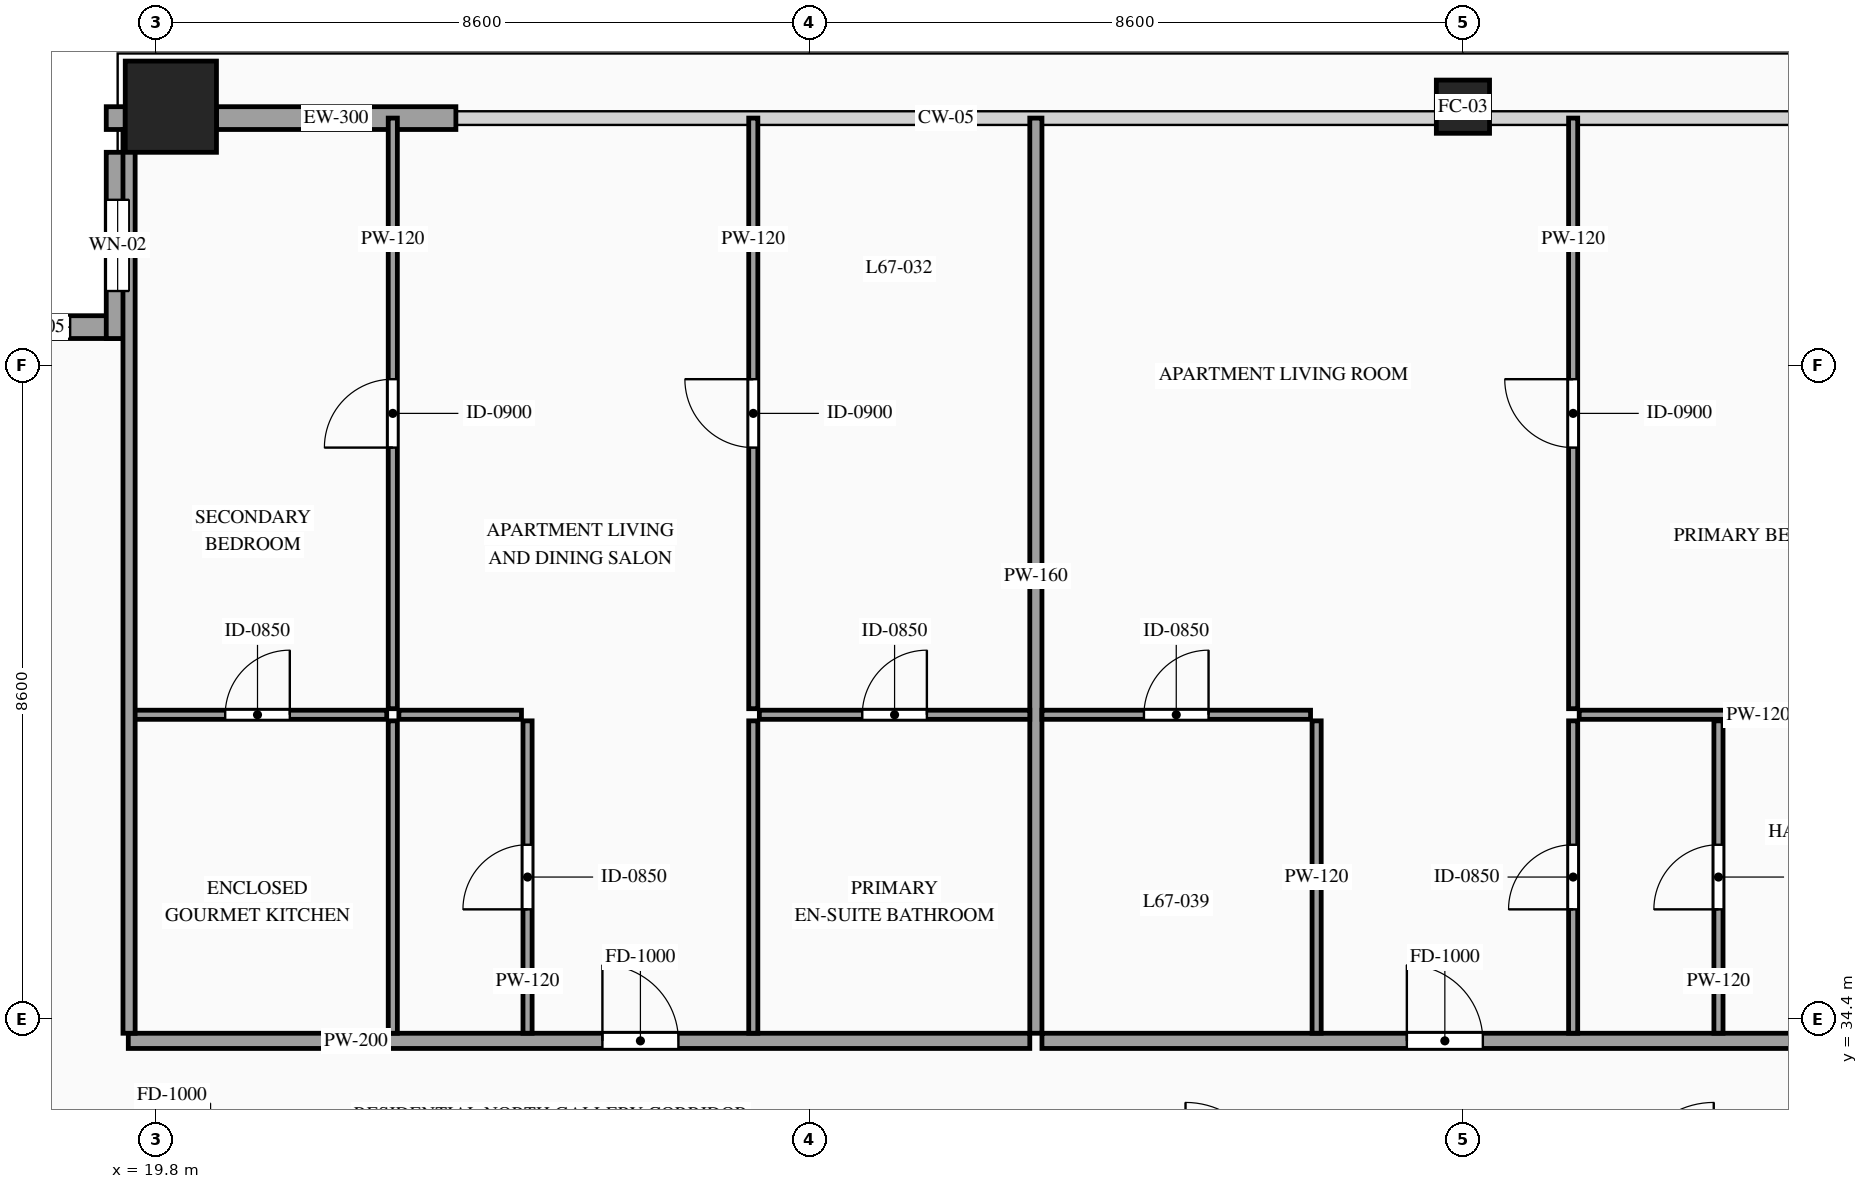
"""IFC4 building model, lengths in metres.
Left out: names, types, materials, properties, quantities, classifications, styles, units other than length and angle.
Written with IfcOpenShell. Run it as: python <this file> out.ifc"""

import sys

from ifc_helpers import new_model, si_unit, direction, frame, frame_2d, origin, origin_2d, place, context, subcontext, project, spatial, rectangle, hollow_rectangle, extrude, source, transform, mapped, element, fill, save


model = new_model("IFC4")
c1 = context("Model", 3, precision=1e-05, world=origin(), true_north=direction((0.0, 1.0)))
c2 = subcontext(c1, "Body", "Model", "MODEL_VIEW")
j1 = project(units=[si_unit("LENGTHUNIT", "METRE"), si_unit("PLANEANGLEUNIT", "RADIAN")], contexts=[c1])
p1 = place(None, origin())
s1 = spatial("IfcSite", under=j1, at=p1, CompositionType="ELEMENT")
p2 = place(p1, origin())
s2 = spatial("IfcBuilding", under=s1, at=p2, CompositionType="ELEMENT")
p3 = place(p2, frame((0.0, 0.0, 252.1)))
s3 = spatial("IfcBuildingStorey", under=s2, at=p3, CompositionType="ELEMENT", Elevation=252.1)
m1 = source(origin(), c2, "Body", "SweptSolid", [
    extrude(hollow_rectangle(XDim=1.2, YDim=1.2, WallThickness=0.055, at=origin_2d()), origin(), (0.0, 0.0, 1.0), 3.5),
])
p4 = place(p3, frame((20.0, 46.4, 0.0), z_axis=(0.0, 0.0, 1.0), x_axis=(1.0, 0.0, 0.0)))
e1 = element("IfcColumn", 1, at=p4, inside=s3, PredefinedType="COLUMN", context=c2, shape_type="MappedRepresentation", body=[
    mapped(m1, transform((0.0, 0.0, 0.0), scale=1.0)),
])
m2 = source(origin(), c2, "Body", "SweptSolid", [
    extrude(hollow_rectangle(XDim=0.7, YDim=0.7, WallThickness=0.032, at=origin_2d()), origin(), (0.0, 0.0, 1.0), 3.5),
])
p5 = place(p3, frame((37.0, 46.4, 0.0), z_axis=(0.0, 0.0, 1.0), x_axis=(1.0, 0.0, 0.0)))
e2 = element("IfcColumn", 2, at=p5, inside=s3, PredefinedType="COLUMN", context=c2, shape_type="MappedRepresentation", body=[
    mapped(m2, transform((0.0, 0.0, 0.0), scale=1.0)),
])
p6 = place(p3, frame((19.45, 43.5, 0.0), z_axis=(0.0, 0.0, 1.0), x_axis=(-1.0, 0.0, 0.0)))
e3 = element("IfcWall", 3, at=p6, inside=s3, PredefinedType="SOLIDWALL", context=c2, shape_type="SweptSolid", body=[
    extrude(rectangle(XDim=2.45, YDim=0.3, at=frame_2d((1.225, 0.0))), origin(), (0.0, 0.0, 1.0), 3.28),
])
p7 = place(p6, frame((0.775, 0.0, 0.85)))
e4 = element("IfcOpeningElement", 4, at=p7, cuts=e3, PredefinedType="OPENING", context=c2, shape_type="SweptSolid", body=[
    extrude(rectangle(XDim=0.9, YDim=1.5, at=frame_2d((0.45, 0.75))), frame((0.0, 0.165, 0.0), z_axis=(0.0, -1.0, 0.0), x_axis=(1.0, 0.0, 0.0)), (0.0, 0.0, 1.0), 0.33),
])
p8 = place(p3, frame((19.3, 45.8, 0.0), z_axis=(0.0, 0.0, 1.0), x_axis=(0.0, -1.0, 0.0)))
e5 = element("IfcWall", 5, at=p8, inside=s3, PredefinedType="SOLIDWALL", context=c2, shape_type="SweptSolid", body=[
    extrude(rectangle(XDim=2.45, YDim=0.3, at=frame_2d((1.225, 0.0))), origin(), (0.0, 0.0, 1.0), 3.28),
])
p9 = place(p8, frame((0.625, 0.0, 0.85)))
e6 = element("IfcOpeningElement", 6, at=p9, cuts=e5, PredefinedType="OPENING", context=c2, shape_type="SweptSolid", body=[
    extrude(rectangle(XDim=1.2, YDim=2.1, at=frame_2d((0.6, 1.05))), frame((0.0, 0.165, 0.0), z_axis=(0.0, -1.0, 0.0), x_axis=(1.0, 0.0, 0.0)), (0.0, 0.0, 1.0), 0.33),
])
m3 = source(origin(), c2, "Body", "SweptSolid", [
    extrude(rectangle(XDim=0.25, YDim=0.3, at=frame_2d((0.125, 0.0))), origin(), (0.0, 0.0, 1.0), 3.28),
])
p10 = place(p3, frame((19.15, 46.25, 0.0), z_axis=(0.0, 0.0, 1.0), x_axis=(1.0, 0.0, 0.0)))
e7 = element("IfcWall", 7, at=p10, inside=s3, PredefinedType="SOLIDWALL", context=c2, shape_type="MappedRepresentation", body=[
    mapped(m3, transform((0.0, 0.0, 0.0), scale=1.0)),
])
m4 = source(origin(), c2, "Body", "SweptSolid", [
    extrude(rectangle(XDim=3.15, YDim=0.3, at=frame_2d((1.575, 0.0))), origin(), (0.0, 0.0, 1.0), 2.835),
])
p11 = place(p3, frame((20.6, 46.25, 0.0), z_axis=(0.0, 0.0, 1.0), x_axis=(1.0, 0.0, 0.0)))
e8 = element("IfcWall", 8, at=p11, inside=s3, PredefinedType="SOLIDWALL", context=c2, shape_type="MappedRepresentation", body=[
    mapped(m4, transform((0.0, 0.0, 0.0), scale=1.0)),
])
p12 = place(p3, frame((19.44, 34.11, 0.0), z_axis=(0.0, 0.0, 1.0), x_axis=(1.0, 0.0, 0.0)))
e9 = element("IfcWall", 9, at=p12, inside=s3, PredefinedType="PARTITIONING", context=c2, shape_type="SweptSolid", body=[
    extrude(rectangle(XDim=11.861, YDim=0.2, at=frame_2d((5.931, 0.0))), origin(), (0.0, 0.0, 1.0), 3.28),
])
p13 = place(p12, frame((6.238, 0.0, 0.0)))
e10 = element("IfcOpeningElement", 10, at=p13, cuts=e9, PredefinedType="OPENING", context=c2, shape_type="SweptSolid", body=[
    extrude(rectangle(XDim=1.0, YDim=2.2, at=frame_2d((0.5, 1.1))), frame((0.0, 0.115, 0.0), z_axis=(0.0, -1.0, 0.0), x_axis=(1.0, 0.0, 0.0)), (0.0, 0.0, 1.0), 0.23),
])
m5 = source(origin(), c2, "Body", "SweptSolid", [
    extrude(rectangle(XDim=12.04, YDim=0.16, at=frame_2d((6.02, 0.0))), origin(), (0.0, 0.0, 1.0), 3.28),
])
p14 = place(p3, frame((31.381, 34.21, 0.0), z_axis=(0.0, 0.0, 1.0), x_axis=(0.0, 1.0, 0.0)))
e11 = element("IfcWall", 11, at=p14, inside=s3, PredefinedType="PARTITIONING", context=c2, shape_type="MappedRepresentation", body=[
    mapped(m5, transform((0.0, 0.0, 0.0), scale=1.0)),
])
p15 = place(p3, frame((19.44, 38.4, 0.0), z_axis=(0.0, 0.0, 1.0), x_axis=(1.0, 0.0, 0.0)))
e12 = element("IfcWall", 12, at=p15, inside=s3, PredefinedType="PARTITIONING", context=c2, shape_type="SweptSolid", body=[
    extrude(rectangle(XDim=3.4, YDim=0.12, at=frame_2d((1.7, 0.0))), origin(), (0.0, 0.0, 1.0), 3.28),
])
p16 = place(p15, frame((1.275, 0.0, 0.0)))
e13 = element("IfcOpeningElement", 13, at=p16, cuts=e12, PredefinedType="OPENING", context=c2, shape_type="SweptSolid", body=[
    extrude(rectangle(XDim=0.85, YDim=2.1, at=frame_2d((0.425, 1.05))), frame((0.0, 0.075, 0.0), z_axis=(0.0, -1.0, 0.0), x_axis=(1.0, 0.0, 0.0)), (0.0, 0.0, 1.0), 0.15),
])
m6 = source(origin(), c2, "Body", "SweptSolid", [
    extrude(rectangle(XDim=4.11, YDim=0.12, at=frame_2d((2.055, 0.0))), origin(), (0.0, 0.0, 1.0), 3.28),
])
p17 = place(p3, frame((22.92, 34.21, 0.0), z_axis=(0.0, 0.0, 1.0), x_axis=(0.0, 1.0, 0.0)))
e14 = element("IfcWall", 14, at=p17, inside=s3, PredefinedType="PARTITIONING", context=c2, shape_type="MappedRepresentation", body=[
    mapped(m6, transform((0.0, 0.0, 0.0), scale=1.0)),
])
m7 = source(origin(), c2, "Body", "SweptSolid", [
    extrude(rectangle(XDim=1.613, YDim=0.12, at=frame_2d((0.807, 0.0))), origin(), (0.0, 0.0, 1.0), 3.28),
])
p18 = place(p3, frame((23.0, 38.4, 0.0), z_axis=(0.0, 0.0, 1.0), x_axis=(1.0, 0.0, 0.0)))
e15 = element("IfcWall", 15, at=p18, inside=s3, PredefinedType="PARTITIONING", context=c2, shape_type="MappedRepresentation", body=[
    mapped(m7, transform((0.0, 0.0, 0.0), scale=1.0)),
])
p19 = place(p3, frame((24.693, 34.21, 0.0), z_axis=(0.0, 0.0, 1.0), x_axis=(0.0, 1.0, 0.0)))
e16 = element("IfcWall", 16, at=p19, inside=s3, PredefinedType="PARTITIONING", context=c2, shape_type="SweptSolid", body=[
    extrude(rectangle(XDim=4.11, YDim=0.12, at=frame_2d((2.055, 0.0))), origin(), (0.0, 0.0, 1.0), 3.28),
])
p20 = place(p19, frame((1.63, 0.0, 0.0)))
e17 = element("IfcOpeningElement", 17, at=p20, cuts=e16, PredefinedType="OPENING", context=c2, shape_type="SweptSolid", body=[
    extrude(rectangle(XDim=0.85, YDim=2.1, at=frame_2d((0.425, 1.05))), frame((0.0, 0.075, 0.0), z_axis=(0.0, -1.0, 0.0), x_axis=(1.0, 0.0, 0.0)), (0.0, 0.0, 1.0), 0.15),
])
p21 = place(p3, frame((27.743, 38.4, 0.0), z_axis=(0.0, 0.0, 1.0), x_axis=(1.0, 0.0, 0.0)))
e18 = element("IfcWall", 18, at=p21, inside=s3, PredefinedType="PARTITIONING", context=c2, shape_type="SweptSolid", body=[
    extrude(rectangle(XDim=3.558, YDim=0.12, at=frame_2d((1.779, 0.0))), origin(), (0.0, 0.0, 1.0), 3.28),
])
p22 = place(p21, frame((1.354, 0.0, 0.0)))
e19 = element("IfcOpeningElement", 19, at=p22, cuts=e18, PredefinedType="OPENING", context=c2, shape_type="SweptSolid", body=[
    extrude(rectangle(XDim=0.85, YDim=2.1, at=frame_2d((0.425, 1.05))), frame((0.0, 0.075, 0.0), z_axis=(0.0, -1.0, 0.0), x_axis=(1.0, 0.0, 0.0)), (0.0, 0.0, 1.0), 0.15),
])
p23 = place(p3, frame((27.663, 34.21, 0.0), z_axis=(0.0, 0.0, 1.0), x_axis=(0.0, 1.0, 0.0)))
e20 = element("IfcWall", 20, at=p23, inside=s3, PredefinedType="PARTITIONING", context=c2, shape_type="MappedRepresentation", body=[
    mapped(m6, transform((0.0, 0.0, 0.0), scale=1.0)),
])
p24 = place(p3, frame((22.92, 38.48, 0.0), z_axis=(0.0, 0.0, 1.0), x_axis=(0.0, 1.0, 0.0)))
e21 = element("IfcWall", 21, at=p24, inside=s3, PredefinedType="PARTITIONING", context=c2, shape_type="SweptSolid", body=[
    extrude(rectangle(XDim=7.77, YDim=0.12, at=frame_2d((3.885, 0.0))), origin(), (0.0, 0.0, 1.0), 3.28),
])
p25 = place(p24, frame((3.435, 0.0, 0.0)))
e22 = element("IfcOpeningElement", 22, at=p25, cuts=e21, PredefinedType="OPENING", context=c2, shape_type="SweptSolid", body=[
    extrude(rectangle(XDim=0.9, YDim=2.15, at=frame_2d((0.45, 1.075))), frame((0.0, 0.075, 0.0), z_axis=(0.0, -1.0, 0.0), x_axis=(1.0, 0.0, 0.0)), (0.0, 0.0, 1.0), 0.15),
])
p26 = place(p3, frame((27.663, 38.48, 0.0), z_axis=(0.0, 0.0, 1.0), x_axis=(0.0, 1.0, 0.0)))
e23 = element("IfcWall", 23, at=p26, inside=s3, PredefinedType="PARTITIONING", context=c2, shape_type="SweptSolid", body=[
    extrude(rectangle(XDim=7.77, YDim=0.12, at=frame_2d((3.885, 0.0))), origin(), (0.0, 0.0, 1.0), 3.28),
])
p27 = place(p26, frame((3.435, 0.0, 0.0)))
e24 = element("IfcOpeningElement", 24, at=p27, cuts=e23, PredefinedType="OPENING", context=c2, shape_type="SweptSolid", body=[
    extrude(rectangle(XDim=0.9, YDim=2.15, at=frame_2d((0.45, 1.075))), frame((0.0, 0.075, 0.0), z_axis=(0.0, -1.0, 0.0), x_axis=(1.0, 0.0, 0.0)), (0.0, 0.0, 1.0), 0.15),
])
p28 = place(p3, frame((31.461, 34.11, 0.0), z_axis=(0.0, 0.0, 1.0), x_axis=(1.0, 0.0, 0.0)))
e25 = element("IfcWall", 25, at=p28, inside=s3, PredefinedType="PARTITIONING", context=c2, shape_type="SweptSolid", body=[
    extrude(rectangle(XDim=11.781, YDim=0.2, at=frame_2d((5.891, 0.0))), origin(), (0.0, 0.0, 1.0), 3.28),
])
p29 = place(p28, frame((4.801, 0.0, 0.0)))
e26 = element("IfcOpeningElement", 26, at=p29, cuts=e25, PredefinedType="OPENING", context=c2, shape_type="SweptSolid", body=[
    extrude(rectangle(XDim=1.0, YDim=2.2, at=frame_2d((0.5, 1.1))), frame((0.0, 0.115, 0.0), z_axis=(0.0, -1.0, 0.0), x_axis=(1.0, 0.0, 0.0)), (0.0, 0.0, 1.0), 0.23),
])
p30 = place(p3, frame((31.461, 38.4, 0.0), z_axis=(0.0, 0.0, 1.0), x_axis=(1.0, 0.0, 0.0)))
e27 = element("IfcWall", 27, at=p30, inside=s3, PredefinedType="PARTITIONING", context=c2, shape_type="SweptSolid", body=[
    extrude(rectangle(XDim=3.534, YDim=0.12, at=frame_2d((1.767, 0.0))), origin(), (0.0, 0.0, 1.0), 3.28),
])
p31 = place(p30, frame((1.342, 0.0, 0.0)))
e28 = element("IfcOpeningElement", 28, at=p31, cuts=e27, PredefinedType="OPENING", context=c2, shape_type="SweptSolid", body=[
    extrude(rectangle(XDim=0.85, YDim=2.1, at=frame_2d((0.425, 1.05))), frame((0.0, 0.075, 0.0), z_axis=(0.0, -1.0, 0.0), x_axis=(1.0, 0.0, 0.0)), (0.0, 0.0, 1.0), 0.15),
])
p32 = place(p3, frame((35.075, 34.21, 0.0), z_axis=(0.0, 0.0, 1.0), x_axis=(0.0, 1.0, 0.0)))
e29 = element("IfcWall", 29, at=p32, inside=s3, PredefinedType="PARTITIONING", context=c2, shape_type="MappedRepresentation", body=[
    mapped(m6, transform((0.0, 0.0, 0.0), scale=1.0)),
])
p33 = place(p3, frame((40.362, 34.21, 0.0), z_axis=(0.0, 0.0, 1.0), x_axis=(0.0, 1.0, 0.0)))
e30 = element("IfcWall", 30, at=p33, inside=s3, PredefinedType="PARTITIONING", context=c2, shape_type="SweptSolid", body=[
    extrude(rectangle(XDim=4.11, YDim=0.12, at=frame_2d((2.055, 0.0))), origin(), (0.0, 0.0, 1.0), 3.28),
])
p34 = place(p33, frame((1.63, 0.0, 0.0)))
e31 = element("IfcOpeningElement", 31, at=p34, cuts=e30, PredefinedType="OPENING", context=c2, shape_type="SweptSolid", body=[
    extrude(rectangle(XDim=0.85, YDim=2.1, at=frame_2d((0.425, 1.05))), frame((0.0, 0.075, 0.0), z_axis=(0.0, -1.0, 0.0), x_axis=(1.0, 0.0, 0.0)), (0.0, 0.0, 1.0), 0.15),
])
m8 = source(origin(), c2, "Body", "SweptSolid", [
    extrude(rectangle(XDim=4.712, YDim=0.12, at=frame_2d((2.356, 0.0))), origin(), (0.0, 0.0, 1.0), 3.28),
])
p35 = place(p3, frame((38.53, 38.4, 0.0), z_axis=(0.0, 0.0, 1.0), x_axis=(1.0, 0.0, 0.0)))
e32 = element("IfcWall", 32, at=p35, inside=s3, PredefinedType="PARTITIONING", context=c2, shape_type="MappedRepresentation", body=[
    mapped(m8, transform((0.0, 0.0, 0.0), scale=1.0)),
])
p36 = place(p3, frame((38.45, 38.48, 0.0), z_axis=(0.0, 0.0, 1.0), x_axis=(0.0, 1.0, 0.0)))
e33 = element("IfcWall", 33, at=p36, inside=s3, PredefinedType="PARTITIONING", context=c2, shape_type="SweptSolid", body=[
    extrude(rectangle(XDim=7.77, YDim=0.12, at=frame_2d((3.885, 0.0))), origin(), (0.0, 0.0, 1.0), 3.28),
])
p37 = place(p36, frame((3.435, 0.0, 0.0)))
e34 = element("IfcOpeningElement", 34, at=p37, cuts=e33, PredefinedType="OPENING", context=c2, shape_type="SweptSolid", body=[
    extrude(rectangle(XDim=0.9, YDim=2.15, at=frame_2d((0.45, 1.075))), frame((0.0, 0.075, 0.0), z_axis=(0.0, -1.0, 0.0), x_axis=(1.0, 0.0, 0.0)), (0.0, 0.0, 1.0), 0.15),
])
p38 = place(p3, frame((38.45, 34.21, 0.0), z_axis=(0.0, 0.0, 1.0), x_axis=(0.0, 1.0, 0.0)))
e35 = element("IfcWall", 35, at=p38, inside=s3, PredefinedType="PARTITIONING", context=c2, shape_type="SweptSolid", body=[
    extrude(rectangle(XDim=4.11, YDim=0.12, at=frame_2d((2.055, 0.0))), origin(), (0.0, 0.0, 1.0), 3.28),
])
p39 = place(p38, frame((1.63, 0.0, 0.0)))
e36 = element("IfcOpeningElement", 36, at=p39, cuts=e35, PredefinedType="OPENING", context=c2, shape_type="SweptSolid", body=[
    extrude(rectangle(XDim=0.85, YDim=2.1, at=frame_2d((0.425, 1.05))), frame((0.0, 0.075, 0.0), z_axis=(0.0, -1.0, 0.0), x_axis=(1.0, 0.0, 0.0)), (0.0, 0.0, 1.0), 0.15),
])
m9 = source(origin(), c2, "Body", "SweptSolid", [
    extrude(rectangle(XDim=11.89, YDim=0.16, at=frame_2d((5.945, 0.0))), origin(), (0.0, 0.0, 1.0), 3.28),
])
p40 = place(p3, frame((19.45, 34.21, 0.0), z_axis=(0.0, 0.0, 1.0), x_axis=(0.0, 1.0, 0.0)))
e37 = element("IfcWall", 37, at=p40, inside=s3, PredefinedType="PARTITIONING", context=c2, shape_type="MappedRepresentation", body=[
    mapped(m9, transform((0.0, 0.0, 0.0), scale=1.0)),
])
m10 = source(origin(), c2, "Body", "SweptSolid", [
    extrude(rectangle(XDim=0.9, YDim=1.5, at=frame_2d((0.45, 0.75))), frame((0.0, 0.03, 0.0), z_axis=(0.0, -1.0, 0.0), x_axis=(1.0, 0.0, 0.0)), (0.0, 0.0, 1.0), 0.06),
])
p41 = place(p7, origin())
e38 = element("IfcWindow", 38, at=p41, inside=s3, PartitioningType="SINGLE_PANEL", PredefinedType="WINDOW", context=c2, shape_type="MappedRepresentation", body=[
    mapped(m10, transform((0.0, 0.0, 0.0), scale=1.0)),
])
fill(e4, e38)
m11 = source(origin(), c2, "Body", "SweptSolid", [
    extrude(rectangle(XDim=1.2, YDim=2.1, at=frame_2d((0.6, 1.05))), frame((0.0, 0.03, 0.0), z_axis=(0.0, -1.0, 0.0), x_axis=(1.0, 0.0, 0.0)), (0.0, 0.0, 1.0), 0.06),
])
p42 = place(p9, origin())
e39 = element("IfcWindow", 39, at=p42, inside=s3, PartitioningType="SINGLE_PANEL", PredefinedType="WINDOW", context=c2, shape_type="MappedRepresentation", body=[
    mapped(m11, transform((0.0, 0.0, 0.0), scale=1.0)),
])
fill(e6, e39)
m12 = source(origin(), c2, "Body", "SweptSolid", [
    extrude(rectangle(XDim=1.0, YDim=2.2, at=frame_2d((0.5, 1.1))), frame((0.0, 0.025, 0.0), z_axis=(0.0, -1.0, 0.0), x_axis=(1.0, 0.0, 0.0)), (0.0, 0.0, 1.0), 0.05),
])
p43 = place(p13, origin())
e40 = element("IfcDoor", 40, at=p43, inside=s3, OperationType="SINGLE_SWING_LEFT", PredefinedType="DOOR", context=c2, shape_type="MappedRepresentation", body=[
    mapped(m12, transform((0.0, 0.0, 0.0), scale=1.0)),
])
fill(e10, e40)
m13 = source(origin(), c2, "Body", "SweptSolid", [
    extrude(rectangle(XDim=0.85, YDim=2.1, at=frame_2d((0.425, 1.05))), frame((0.0, 0.025, 0.0), z_axis=(0.0, -1.0, 0.0), x_axis=(1.0, 0.0, 0.0)), (0.0, 0.0, 1.0), 0.05),
])
p44 = place(p16, origin())
e41 = element("IfcDoor", 41, at=p44, inside=s3, OperationType="SINGLE_SWING_RIGHT", PredefinedType="DOOR", context=c2, shape_type="MappedRepresentation", body=[
    mapped(m13, transform((0.0, 0.0, 0.0), scale=1.0)),
])
fill(e13, e41)
p45 = place(p20, origin())
e42 = element("IfcDoor", 42, at=p45, inside=s3, OperationType="SINGLE_SWING_LEFT", PredefinedType="DOOR", context=c2, shape_type="MappedRepresentation", body=[
    mapped(m13, transform((0.0, 0.0, 0.0), scale=1.0)),
])
fill(e17, e42)
p46 = place(p22, origin())
e43 = element("IfcDoor", 43, at=p46, inside=s3, OperationType="SINGLE_SWING_RIGHT", PredefinedType="DOOR", context=c2, shape_type="MappedRepresentation", body=[
    mapped(m13, transform((0.0, 0.0, 0.0), scale=1.0)),
])
fill(e19, e43)
m14 = source(origin(), c2, "Body", "SweptSolid", [
    extrude(rectangle(XDim=0.9, YDim=2.15, at=frame_2d((0.45, 1.075))), frame((0.0, 0.025, 0.0), z_axis=(0.0, -1.0, 0.0), x_axis=(1.0, 0.0, 0.0)), (0.0, 0.0, 1.0), 0.05),
])
p47 = place(p25, origin())
e44 = element("IfcDoor", 44, at=p47, inside=s3, OperationType="SINGLE_SWING_LEFT", PredefinedType="DOOR", context=c2, shape_type="MappedRepresentation", body=[
    mapped(m14, transform((0.0, 0.0, 0.0), scale=1.0)),
])
fill(e22, e44)
p48 = place(p27, origin())
e45 = element("IfcDoor", 45, at=p48, inside=s3, OperationType="SINGLE_SWING_RIGHT", PredefinedType="DOOR", context=c2, shape_type="MappedRepresentation", body=[
    mapped(m14, transform((0.0, 0.0, 0.0), scale=1.0)),
])
fill(e24, e45)
p49 = place(p29, origin())
e46 = element("IfcDoor", 46, at=p49, inside=s3, OperationType="SINGLE_SWING_LEFT", PredefinedType="DOOR", context=c2, shape_type="MappedRepresentation", body=[
    mapped(m12, transform((0.0, 0.0, 0.0), scale=1.0)),
])
fill(e26, e46)
p50 = place(p31, origin())
e47 = element("IfcDoor", 47, at=p50, inside=s3, OperationType="SINGLE_SWING_RIGHT", PredefinedType="DOOR", context=c2, shape_type="MappedRepresentation", body=[
    mapped(m13, transform((0.0, 0.0, 0.0), scale=1.0)),
])
fill(e28, e47)
p51 = place(p34, origin())
e48 = element("IfcDoor", 48, at=p51, inside=s3, OperationType="SINGLE_SWING_LEFT", PredefinedType="DOOR", context=c2, shape_type="MappedRepresentation", body=[
    mapped(m13, transform((0.0, 0.0, 0.0), scale=1.0)),
])
fill(e31, e48)
p52 = place(p37, origin())
e49 = element("IfcDoor", 49, at=p52, inside=s3, OperationType="SINGLE_SWING_RIGHT", PredefinedType="DOOR", context=c2, shape_type="MappedRepresentation", body=[
    mapped(m14, transform((0.0, 0.0, 0.0), scale=1.0)),
])
fill(e34, e49)
p53 = place(p39, origin())
e50 = element("IfcDoor", 50, at=p53, inside=s3, OperationType="SINGLE_SWING_LEFT", PredefinedType="DOOR", context=c2, shape_type="MappedRepresentation", body=[
    mapped(m13, transform((0.0, 0.0, 0.0), scale=1.0)),
])
fill(e36, e50)
save(model, sys.argv[1])
